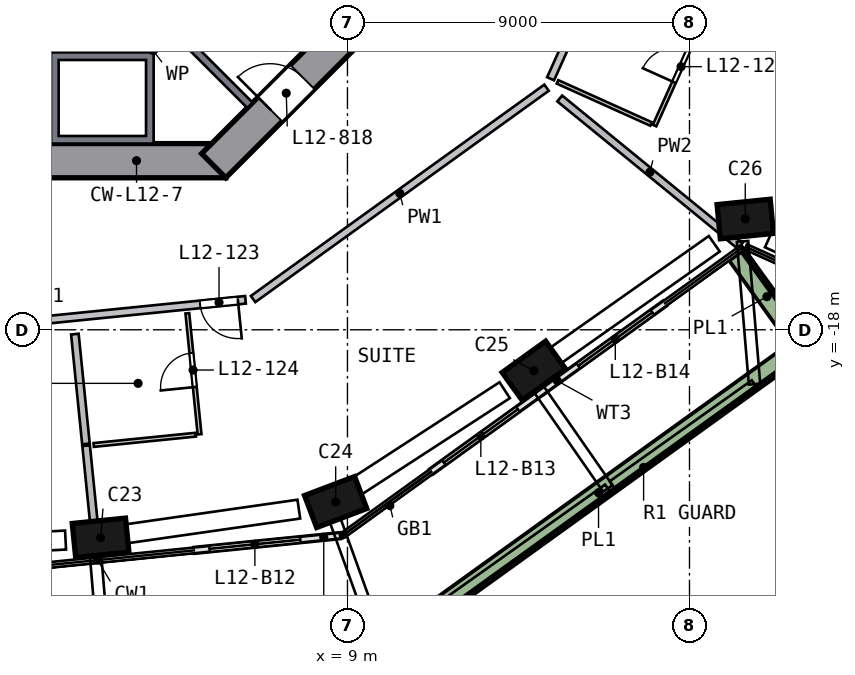
"""IFC4 building model, lengths in metres.
Left out: names, types, materials, properties, quantities, classifications, styles, units other than length and angle.
Written with IfcOpenShell. Run it as: python <this file> out.ifc"""

import sys

from ifc_helpers import new_model, si_unit, direction, frame, frame_2d, origin, origin_2d, place, context, subcontext, project, spatial, polyline, rectangle, outline, extrude, element, fill, save


model = new_model("IFC4")
c1 = context("Model", 3, precision=1e-05, world=origin(), true_north=direction((0.0, 1.0)))
c2 = subcontext(c1, "Body", "Model", "MODEL_VIEW")
j1 = project(units=[si_unit("LENGTHUNIT", "METRE"), si_unit("PLANEANGLEUNIT", "RADIAN")], contexts=[c1])
p1 = place(None, origin())
s1 = spatial("IfcSite", under=j1, at=p1, CompositionType="ELEMENT")
p2 = place(p1, origin())
s2 = spatial("IfcBuilding", under=s1, at=p2, CompositionType="ELEMENT")
p3 = place(p2, frame((0.0, 0.0, 56.5)))
s3 = spatial("IfcBuildingStorey", under=s2, at=p3, CompositionType="ELEMENT", Elevation=56.5)
p4 = place(p3, frame((2.369, -23.489, 0.0), z_axis=(0.111641928, 0.012168058, 0.993674), x_axis=(0.988702484, 0.09927897, -0.112299088)))
e1 = element("IfcColumn", 1, at=p4, inside=s3, PredefinedType="COLUMN", context=c2, shape_type="SweptSolid", body=[
    extrude(rectangle(XDim=1.4, YDim=0.9, at=origin_2d()), origin(), (0.0, 0.0, 1.0), 3.21),
])
p5 = place(p3, frame((8.561, -22.583, 0.0), z_axis=(0.10704763, 0.041587396, 0.993383759), x_axis=(-0.928982675, -0.351857103, 0.11483801)))
e2 = element("IfcColumn", 2, at=p5, inside=s3, PredefinedType="COLUMN", context=c2, shape_type="SweptSolid", body=[
    extrude(rectangle(XDim=1.4, YDim=0.9, at=origin_2d()), origin(), (0.0, 0.0, 1.0), 3.211),
])
p6 = place(p3, frame((13.796, -19.157, 0.0), z_axis=(0.090651408, 0.066391509, 0.993667193), x_axis=(0.806614945, 0.580299679, -0.112359302)))
e3 = element("IfcColumn", 3, at=p6, inside=s3, PredefinedType="COLUMN", context=c2, shape_type="SweptSolid", body=[
    extrude(rectangle(XDim=1.4, YDim=0.9, at=origin_2d()), origin(), (0.0, 0.0, 1.0), 3.21),
])
p7 = place(p3, frame((19.381, -15.197, 0.0), z_axis=(0.071523428, 0.09272963, 0.993119134), x_axis=(-0.992454044, -0.092803173, 0.080140757)))
e4 = element("IfcColumn", 4, at=p7, inside=s3, PredefinedType="COLUMN", context=c2, shape_type="SweptSolid", body=[
    extrude(rectangle(XDim=1.4, YDim=0.9, at=origin_2d()), origin(), (0.0, 0.0, 1.0), 3.212),
])
p8 = place(p3, frame((-5.799, -13.55, 0.0), z_axis=(0.0, 0.0, 1.0), x_axis=(1.0, 0.0, 0.0)))
e5 = element("IfcWall", 5, at=p8, inside=s3, PredefinedType="SHEAR", context=c2, shape_type="SweptSolid", body=[
    extrude(rectangle(XDim=11.598, YDim=0.9, at=frame_2d((5.799, 0.0))), origin(), (0.0, 0.0, 1.0), 3.5),
])
p9 = place(p8, frame((4.899, 0.0, 0.0)))
e6 = element("IfcOpeningElement", 6, at=p9, cuts=e5, PredefinedType="OPENING", context=c2, shape_type="SweptSolid", body=[
    extrude(rectangle(XDim=1.8, YDim=2.1, at=frame_2d((0.9, 1.05))), frame((0.0, 0.46, 0.0), z_axis=(0.0, -1.0, 0.0), x_axis=(1.0, 0.0, 0.0)), (0.0, 0.0, 1.0), 0.92),
])
p10 = place(p3, frame((5.481, -13.682, 0.0), z_axis=(0.0, 0.0, 1.0), x_axis=(0.707106781, 0.707106781, 0.0)))
e7 = element("IfcWall", 7, at=p10, inside=s3, PredefinedType="SHEAR", context=c2, shape_type="SweptSolid", body=[
    extrude(rectangle(XDim=11.598, YDim=0.9, at=frame_2d((5.799, 0.0))), origin(), (0.0, 0.0, 1.0), 3.5),
])
p11 = place(p10, frame((2.099, 0.0, 0.0)))
e8 = element("IfcOpeningElement", 8, at=p11, cuts=e7, PredefinedType="OPENING", context=c2, shape_type="SweptSolid", body=[
    extrude(rectangle(XDim=1.2, YDim=2.1, at=frame_2d((0.6, 1.05))), frame((0.0, 0.46, 0.0), z_axis=(0.0, -1.0, 0.0), x_axis=(1.0, 0.0, 0.0)), (0.0, 0.0, 1.0), 0.92),
])
p12 = place(p3, frame((4.972, -23.804, 0.0), z_axis=(0.0, 0.0, 1.0), x_axis=(0.994952518, 0.100346834, 0.0)))
e9 = element("IfcWall", 9, at=p12, inside=s3, PredefinedType="SOLIDWALL", context=c2, shape_type="SweptSolid", body=[
    extrude(rectangle(XDim=3.842, YDim=0.15, at=frame_2d((1.921, 0.0))), origin(), (0.0, 0.0, 1.0), 2.425),
])
p13 = place(p12, frame((0.4, 0.0, 0.0)))
e10 = element("IfcOpeningElement", 10, at=p13, cuts=e9, PredefinedType="OPENING", context=c2, shape_type="SweptSolid", body=[
    extrude(rectangle(XDim=2.4, YDim=2.4, at=frame_2d((1.2, 1.2))), frame((0.0, 0.085, 0.0), z_axis=(0.0, -1.0, 0.0), x_axis=(1.0, 0.0, 0.0)), (0.0, 0.0, 1.0), 0.17),
])
p14 = place(p3, frame((11.211, -21.728, 0.0), z_axis=(0.0, 0.0, 1.0), x_axis=(0.811486746, 0.584370825, 0.0)))
e11 = element("IfcWall", 11, at=p14, inside=s3, PredefinedType="SOLIDWALL", context=c2, shape_type="SweptSolid", body=[
    extrude(rectangle(XDim=3.6, YDim=0.15, at=frame_2d((1.8, 0.0))), origin(), (0.0, 0.0, 1.0), 2.425),
])
p15 = place(p14, frame((0.4, 0.0, 0.0)))
e12 = element("IfcOpeningElement", 12, at=p15, cuts=e11, PredefinedType="OPENING", context=c2, shape_type="SweptSolid", body=[
    extrude(rectangle(XDim=2.4, YDim=2.4, at=frame_2d((1.2, 1.2))), frame((0.0, 0.085, 0.0), z_axis=(0.0, -1.0, 0.0), x_axis=(1.0, 0.0, 0.0)), (0.0, 0.0, 1.0), 0.17),
])
p16 = place(p3, frame((14.133, -19.624, 0.0), z_axis=(0.0, 0.0, 1.0), x_axis=(0.811478215, 0.584382671, 0.0)))
e13 = element("IfcWall", 13, at=p16, inside=s3, PredefinedType="SOLIDWALL", context=c2, shape_type="SweptSolid", body=[
    extrude(rectangle(XDim=3.96, YDim=0.15, at=frame_2d((1.98, 0.0))), origin(), (0.0, 0.0, 1.0), 2.425),
])
p17 = place(p16, frame((1.16, 0.0, 0.0)))
e14 = element("IfcOpeningElement", 14, at=p17, cuts=e13, PredefinedType="OPENING", context=c2, shape_type="SweptSolid", body=[
    extrude(rectangle(XDim=2.4, YDim=2.4, at=frame_2d((1.2, 1.2))), frame((0.0, 0.085, 0.0), z_axis=(0.0, -1.0, 0.0), x_axis=(1.0, 0.0, 0.0)), (0.0, 0.0, 1.0), 0.17),
])
p18 = place(p3, frame((10.039, -26.3, 0.0), z_axis=(0.0, 0.0, 1.0), x_axis=(0.811475962, 0.5843858, 0.0)))
e15 = element("IfcWall", 15, at=p18, inside=s3, PredefinedType="SOLIDWALL", context=c2, shape_type="SweptSolid", body=[
    extrude(rectangle(XDim=13.723, YDim=0.5, at=frame_2d((6.862, 0.0))), origin(), (0.0, 0.0, 1.0), 0.7),
])
p19 = place(p3, frame((20.826, -18.223, 0.0), z_axis=(0.0, 0.0, 1.0), x_axis=(-0.584416714, 0.811453698, 0.0)))
e16 = element("IfcWall", 16, at=p19, inside=s3, PredefinedType="SOLIDWALL", context=c2, shape_type="SweptSolid", body=[
    extrude(rectangle(XDim=2.699, YDim=0.5, at=frame_2d((1.35, 0.0))), origin(), (0.0, 0.0, 1.0), 0.7),
])
p20 = place(p3, origin())
e17 = element("IfcWall", 17, at=p20, inside=s3, PredefinedType="SOLIDWALL", context=c2, shape_type="SweptSolid", body=[
    extrude(outline(polyline([(3.9, -10.7), (3.9, -13.1), (1.2, -13.1), (1.2, -10.7), (3.9, -10.7)]), holes=[polyline([(1.4, -12.9), (3.7, -12.9), (3.7, -10.9), (1.4, -10.9), (1.4, -12.9)])]), origin(), (0.0, 0.0, 1.0), 3.19),
])
p21 = place(p3, frame((3.677, -9.334, 0.0), z_axis=(0.0, 0.0, 1.0), x_axis=(0.707106781, -0.707106781, 0.0)))
e18 = element("IfcWall", 18, at=p21, inside=s3, PredefinedType="SOLIDWALL", context=c2, shape_type="SweptSolid", body=[
    extrude(rectangle(XDim=3.9, YDim=0.2, at=frame_2d((1.95, 0.0))), origin(), (0.0, 0.0, 1.0), 3.19),
])
p22 = place(p3, frame((3.9, -10.7, 0.0), z_axis=(0.0, 0.0, 1.0), x_axis=(-0.289808785, 0.957084567, 0.0)))
e19 = element("IfcWall", 19, at=p22, inside=s3, PredefinedType="PARTITIONING", context=c2, shape_type="SweptSolid", body=[
    extrude(rectangle(XDim=1.501, YDim=0.15, at=frame_2d((0.75, 0.0))), origin(), (0.0, 0.0, 1.0), 3.19),
])
p23 = place(p22, frame((0.301, 0.0, 0.0)))
e20 = element("IfcOpeningElement", 20, at=p23, cuts=e19, PredefinedType="OPENING", context=c2, shape_type="SweptSolid", body=[
    extrude(rectangle(XDim=0.9, YDim=2.1, at=frame_2d((0.45, 1.05))), frame((0.0, 0.085, 0.0), z_axis=(0.0, -1.0, 0.0), x_axis=(1.0, 0.0, 0.0)), (0.0, 0.0, 1.0), 0.17),
])
p24 = place(p3, frame((6.317, -17.211, 0.0), z_axis=(0.0, 0.0, 1.0), x_axis=(-0.99494876, -0.100384084, 0.0)))
e21 = element("IfcWall", 21, at=p24, inside=s3, PredefinedType="SOLIDWALL", context=c2, shape_type="SweptSolid", body=[
    extrude(rectangle(XDim=9.115, YDim=0.2, at=frame_2d((4.558, 0.0))), origin(), (0.0, 0.0, 1.0), 3.19),
])
p25 = place(p24, frame((0.2, 0.0, 0.0)))
e22 = element("IfcOpeningElement", 22, at=p25, cuts=e21, PredefinedType="OPENING", context=c2, shape_type="SweptSolid", body=[
    extrude(rectangle(XDim=1.0, YDim=2.1, at=frame_2d((0.5, 1.05))), frame((0.0, 0.11, 0.0), z_axis=(0.0, -1.0, 0.0), x_axis=(1.0, 0.0, 0.0)), (0.0, 0.0, 1.0), 0.22),
])
p26 = place(p3, frame((6.517, -17.191, 0.0), z_axis=(0.0, 0.0, 1.0), x_axis=(0.811459882, 0.584408127, 0.0)))
e23 = element("IfcWall", 23, at=p26, inside=s3, PredefinedType="SOLIDWALL", context=c2, shape_type="SweptSolid", body=[
    extrude(rectangle(XDim=9.516, YDim=0.2, at=frame_2d((4.758, 0.0))), origin(), (0.0, 0.0, 1.0), 3.19),
])
p27 = place(p3, frame((14.345, -11.394, 0.0), z_axis=(0.0, 0.0, 1.0), x_axis=(0.41053785, 0.911843558, 0.0)))
e24 = element("IfcWall", 24, at=p27, inside=s3, PredefinedType="SOLIDWALL", context=c2, shape_type="SweptSolid", body=[
    extrude(rectangle(XDim=3.4, YDim=0.2, at=frame_2d((1.7, 0.0))), origin(), (0.0, 0.0, 1.0), 3.19),
])
p28 = place(p3, frame((31.033, -15.179, 0.0), z_axis=(0.0, 0.0, 1.0), x_axis=(-0.911836027, 0.410554576, 0.0)))
e25 = element("IfcWall", 25, at=p28, inside=s3, PredefinedType="SOLIDWALL", context=c2, shape_type="SweptSolid", body=[
    extrude(rectangle(XDim=16.571, YDim=0.2, at=frame_2d((8.285, 0.0))), origin(), (0.0, 0.0, 1.0), 3.19),
])
p29 = place(p28, frame((8.7, 0.0, 0.0)))
e26 = element("IfcOpeningElement", 26, at=p29, cuts=e25, PredefinedType="OPENING", context=c2, shape_type="SweptSolid", body=[
    extrude(rectangle(XDim=1.0, YDim=2.1, at=frame_2d((0.5, 1.05))), frame((0.0, 0.11, 0.0), z_axis=(0.0, -1.0, 0.0), x_axis=(1.0, 0.0, 0.0)), (0.0, 0.0, 1.0), 0.22),
])
p30 = place(p3, frame((16.644, -6.288, 0.0), z_axis=(0.0, 0.0, 1.0), x_axis=(0.911830511, -0.410566826, 0.0)))
e27 = element("IfcWall", 27, at=p30, inside=s3, PredefinedType="SOLIDWALL", context=c2, shape_type="SweptSolid", body=[
    extrude(rectangle(XDim=16.571, YDim=0.2, at=frame_2d((8.285, 0.0))), origin(), (0.0, 0.0, 1.0), 3.19),
])
p31 = place(p30, frame((3.95, 0.0, 0.0)))
e28 = element("IfcOpeningElement", 28, at=p31, cuts=e27, PredefinedType="OPENING", context=c2, shape_type="SweptSolid", body=[
    extrude(rectangle(XDim=1.0, YDim=2.1, at=frame_2d((0.5, 1.05))), frame((0.0, 0.11, 0.0), z_axis=(0.0, -1.0, 0.0), x_axis=(1.0, 0.0, 0.0)), (0.0, 0.0, 1.0), 0.22),
])
p32 = place(p3, frame((1.827, -18.114, 0.0), z_axis=(0.0, 0.0, 1.0), x_axis=(0.10036087, -0.994951102, 0.0)))
e29 = element("IfcWall", 29, at=p32, inside=s3, PredefinedType="SOLIDWALL", context=c2, shape_type="SweptSolid", body=[
    extrude(rectangle(XDim=2.905, YDim=0.2, at=frame_2d((1.452, 0.0))), origin(), (0.0, 0.0, 1.0), 3.19),
])
p33 = place(p3, frame((2.123, -21.05, 0.0), z_axis=(0.0, 0.0, 1.0), x_axis=(0.100322558, -0.994954966, 0.0)))
e30 = element("IfcWall", 30, at=p33, inside=s3, PredefinedType="SOLIDWALL", context=c2, shape_type="SweptSolid", body=[
    extrude(rectangle(XDim=2.952, YDim=0.2, at=frame_2d((1.476, 0.0))), origin(), (0.0, 0.0, 1.0), 3.19),
])
p34 = place(p3, frame((14.585, -11.913, 0.0), z_axis=(0.0, 0.0, 1.0), x_axis=(0.774505144, -0.632567611, 0.0)))
e31 = element("IfcWall", 31, at=p34, inside=s3, PredefinedType="SOLIDWALL", context=c2, shape_type="SweptSolid", body=[
    extrude(rectangle(XDim=6.132, YDim=0.2, at=frame_2d((3.066, 0.0))), origin(), (0.0, 0.0, 1.0), 3.19),
])
p35 = place(p3, frame((5.009, -20.76, 0.0), z_axis=(0.0, 0.0, 1.0), x_axis=(-0.994949967, -0.100372122, 0.0)))
e32 = element("IfcWall", 32, at=p35, inside=s3, PredefinedType="PARTITIONING", context=c2, shape_type="SweptSolid", body=[
    extrude(rectangle(XDim=2.7, YDim=0.1, at=frame_2d((1.35, 0.0))), origin(), (0.0, 0.0, 1.0), 3.19),
])
p36 = place(p3, frame((5.108, -20.75, 0.0), z_axis=(0.0, 0.0, 1.0), x_axis=(-0.100402585, 0.994946894, 0.0)))
e33 = element("IfcWall", 33, at=p36, inside=s3, PredefinedType="PARTITIONING", context=c2, shape_type="SweptSolid", body=[
    extrude(rectangle(XDim=3.2, YDim=0.1, at=frame_2d((1.6, 0.0))), origin(), (0.0, 0.0, 1.0), 3.19),
])
p37 = place(p36, frame((1.25, 0.0, 0.0)))
e34 = element("IfcOpeningElement", 34, at=p37, cuts=e33, PredefinedType="OPENING", context=c2, shape_type="SweptSolid", body=[
    extrude(rectangle(XDim=0.9, YDim=2.1, at=frame_2d((0.45, 1.05))), frame((0.0, 0.06, 0.0), z_axis=(0.0, -1.0, 0.0), x_axis=(1.0, 0.0, 0.0)), (0.0, 0.0, 1.0), 0.12),
])
p38 = place(p3, frame((16.99, -12.585, 0.0), z_axis=(0.0, 0.0, 1.0), x_axis=(-0.911847045, 0.410530105, 0.0)))
e35 = element("IfcWall", 35, at=p38, inside=s3, PredefinedType="PARTITIONING", context=c2, shape_type="SweptSolid", body=[
    extrude(rectangle(XDim=2.7, YDim=0.1, at=frame_2d((1.35, 0.0))), origin(), (0.0, 0.0, 1.0), 3.19),
])
p39 = place(p3, frame((17.081, -12.626, 0.0), z_axis=(0.0, 0.0, 1.0), x_axis=(0.410558188, 0.911834401, 0.0)))
e36 = element("IfcWall", 36, at=p39, inside=s3, PredefinedType="PARTITIONING", context=c2, shape_type="SweptSolid", body=[
    extrude(rectangle(XDim=3.2, YDim=0.1, at=frame_2d((1.6, 0.0))), origin(), (0.0, 0.0, 1.0), 3.19),
])
p40 = place(p39, frame((1.25, 0.0, 0.0)))
e37 = element("IfcOpeningElement", 37, at=p40, cuts=e36, PredefinedType="OPENING", context=c2, shape_type="SweptSolid", body=[
    extrude(rectangle(XDim=0.9, YDim=2.1, at=frame_2d((0.45, 1.05))), frame((0.0, 0.06, 0.0), z_axis=(0.0, -1.0, 0.0), x_axis=(1.0, 0.0, 0.0)), (0.0, 0.0, 1.0), 0.12),
])
p41 = place(p13, origin())
e38 = element("IfcDoor", 38, at=p41, inside=s3, OperationType="SLIDING_TO_RIGHT", PredefinedType="DOOR", context=c2, shape_type="SweptSolid", body=[
    extrude(rectangle(XDim=2.4, YDim=2.4, at=frame_2d((1.2, 1.2))), frame((0.0, 0.025, 0.0), z_axis=(0.0, -1.0, 0.0), x_axis=(1.0, 0.0, 0.0)), (0.0, 0.0, 1.0), 0.05),
])
fill(e10, e38)
p42 = place(p15, origin())
e39 = element("IfcDoor", 39, at=p42, inside=s3, OperationType="SLIDING_TO_RIGHT", PredefinedType="DOOR", context=c2, shape_type="SweptSolid", body=[
    extrude(rectangle(XDim=2.4, YDim=2.4, at=frame_2d((1.2, 1.2))), frame((0.0, 0.025, 0.0), z_axis=(0.0, -1.0, 0.0), x_axis=(1.0, 0.0, 0.0)), (0.0, 0.0, 1.0), 0.05),
])
fill(e12, e39)
p43 = place(p17, origin())
e40 = element("IfcDoor", 40, at=p43, inside=s3, OperationType="SLIDING_TO_LEFT", PredefinedType="DOOR", context=c2, shape_type="SweptSolid", body=[
    extrude(rectangle(XDim=2.4, YDim=2.4, at=frame_2d((1.2, 1.2))), frame((0.0, 0.025, 0.0), z_axis=(0.0, -1.0, 0.0), x_axis=(1.0, 0.0, 0.0)), (0.0, 0.0, 1.0), 0.05),
])
fill(e14, e40)
p44 = place(p11, origin())
e41 = element("IfcDoor", 41, at=p44, inside=s3, OperationType="SINGLE_SWING_LEFT", PredefinedType="DOOR", context=c2, shape_type="SweptSolid", body=[
    extrude(rectangle(XDim=1.2, YDim=2.1, at=frame_2d((0.6, 1.05))), frame((0.0, 0.025, 0.0), z_axis=(0.0, -1.0, 0.0), x_axis=(1.0, 0.0, 0.0)), (0.0, 0.0, 1.0), 0.05),
])
fill(e8, e41)
p45 = place(p25, origin())
e42 = element("IfcDoor", 42, at=p45, inside=s3, OperationType="SINGLE_SWING_LEFT", PredefinedType="DOOR", context=c2, shape_type="SweptSolid", body=[
    extrude(rectangle(XDim=1.0, YDim=2.1, at=frame_2d((0.5, 1.05))), frame((0.0, 0.025, 0.0), z_axis=(0.0, -1.0, 0.0), x_axis=(1.0, 0.0, 0.0)), (0.0, 0.0, 1.0), 0.05),
])
fill(e22, e42)
p46 = place(p37, origin())
e43 = element("IfcDoor", 43, at=p46, inside=s3, OperationType="SINGLE_SWING_LEFT", PredefinedType="DOOR", context=c2, shape_type="SweptSolid", body=[
    extrude(rectangle(XDim=0.9, YDim=2.1, at=frame_2d((0.45, 1.05))), frame((0.0, 0.025, 0.0), z_axis=(0.0, -1.0, 0.0), x_axis=(1.0, 0.0, 0.0)), (0.0, 0.0, 1.0), 0.05),
])
fill(e34, e43)
p47 = place(p40, origin())
e44 = element("IfcDoor", 44, at=p47, inside=s3, OperationType="SINGLE_SWING_LEFT", PredefinedType="DOOR", context=c2, shape_type="SweptSolid", body=[
    extrude(rectangle(XDim=0.9, YDim=2.1, at=frame_2d((0.45, 1.05))), frame((0.0, 0.025, 0.0), z_axis=(0.0, -1.0, 0.0), x_axis=(1.0, 0.0, 0.0)), (0.0, 0.0, 1.0), 0.05),
])
fill(e37, e44)
save(model, sys.argv[1])
